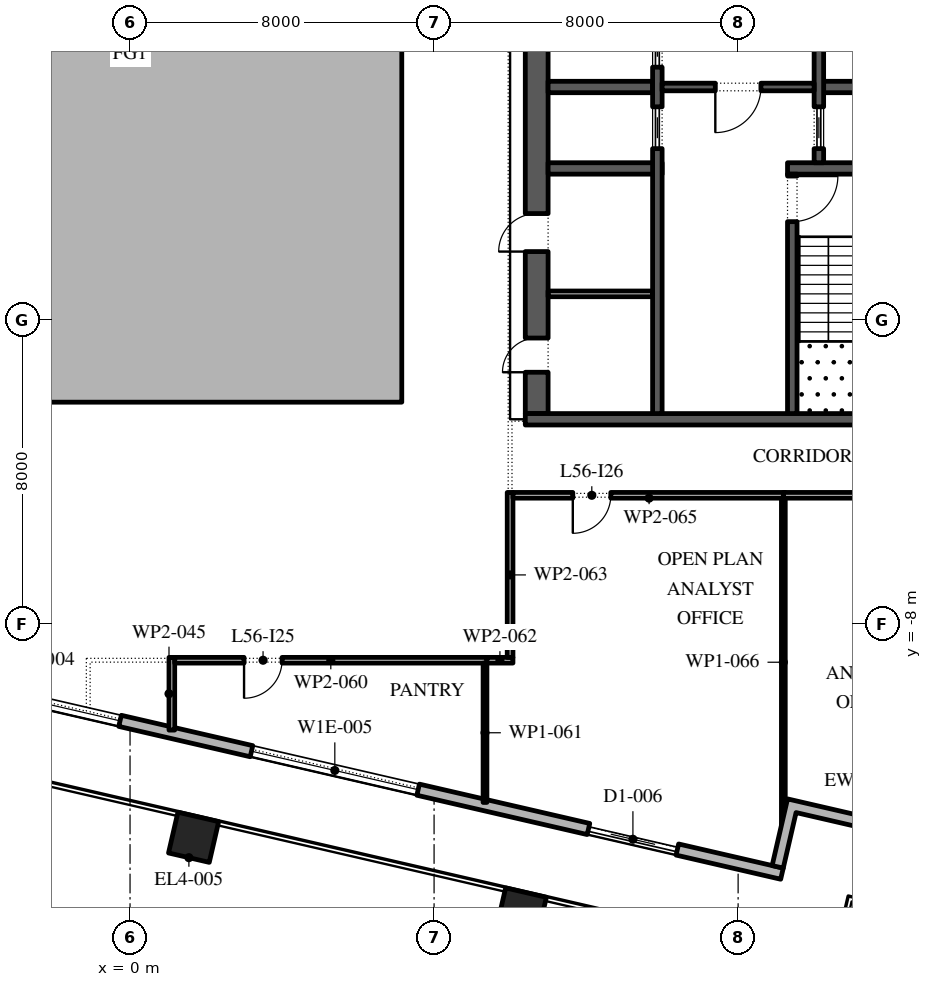
"""IFC4 building model, lengths in metres.
Left out: names, types, materials, properties, quantities, classifications, styles, units other than length and angle.
Written with IfcOpenShell. Run it as: python <this file> out.ifc"""

import sys

from ifc_helpers import new_model, si_unit, direction, frame, frame_2d, origin, origin_2d, place, context, subcontext, project, spatial, polyline, rectangle, outline, extrude, element, fill, save


model = new_model("IFC4")
c1 = context("Model", 3, precision=1e-05, world=origin(), true_north=direction((0.0, 1.0)))
c2 = subcontext(c1, "Body", "Model", "MODEL_VIEW")
j1 = project(units=[si_unit("LENGTHUNIT", "METRE"), si_unit("PLANEANGLEUNIT", "RADIAN")], contexts=[c1])
p1 = place(None, origin())
s1 = spatial("IfcSite", under=j1, at=p1, CompositionType="ELEMENT")
p2 = place(p1, origin())
s2 = spatial("IfcBuilding", under=s1, at=p2, CompositionType="ELEMENT")
p3 = place(p2, frame((0.0, 0.0, 259.8)))
s3 = spatial("IfcBuildingStorey", under=s2, at=p3, CompositionType="ELEMENT", Elevation=259.8)
for number, where, z_axis, x_axis in (
    (1, (1.672, -13.599, 0.0), (0.0, 0.0, 1.0), (0.974, -0.225, 0.0)),
    (2, (10.295, -15.59, 0.0), (0.0, 0.0, 1.0), (0.974, -0.225, 0.0)),
):
    element("IfcColumn", number, at=place(p3, frame(where, z_axis=z_axis, x_axis=x_axis)), inside=s3, PredefinedType="COLUMN", context=c2, shape_type="SweptSolid", body=[
        extrude(rectangle(XDim=1.1, YDim=1.1, at=origin_2d()), origin(), (0.0, 0.0, 1.0), 4.2),
    ])
p4 = place(p3, origin())
e3 = element("IfcWall", 3, at=p4, inside=s3, PredefinedType="STANDARD", context=c2, shape_type="SweptSolid", body=[
    extrude(outline(polyline([(-7.15, -2.15), (7.15, -2.15), (7.15, 16.15), (-7.15, 16.15), (-7.15, -2.15)]), holes=[polyline([(-7.0, -2.0), (-7.0, 16.0), (7.0, 16.0), (7.0, -2.0), (-7.0, -2.0)])]), origin(), (0.0, 0.0, 1.0), 4.0),
])
p5 = place(p3, frame((-29.616, -3.758, 0.0), z_axis=(0.0, 0.0, 1.0), x_axis=(0.974370532314, -0.224949029246, 0.0)))
e4 = element("IfcWall", 4, at=p5, inside=s3, PredefinedType="STANDARD", context=c2, shape_type="SweptSolid", body=[
    extrude(rectangle(XDim=48.0, YDim=0.3, at=frame_2d((24.0, 0.0))), origin(), (0.0, 0.0, 1.0), 4.0),
])
p6 = place(p5, frame((1.625, 0.0, 0.45)))
e5 = element("IfcOpeningElement", 5, at=p6, cuts=e4, PredefinedType="OPENING", context=c2, shape_type="SweptSolid", body=[
    extrude(rectangle(XDim=4.5, YDim=3.05, at=frame_2d((2.25, 1.525))), frame((0.0, 0.16, 0.0), z_axis=(0.0, -1.0, 0.0), x_axis=(1.0, 0.0, 0.0)), (0.0, 0.0, 1.0), 0.32),
])
p7 = place(p5, frame((10.575, 0.0, 0.0)))
e6 = element("IfcOpeningElement", 6, at=p7, cuts=e4, PredefinedType="OPENING", context=c2, shape_type="SweptSolid", body=[
    extrude(rectangle(XDim=2.4, YDim=3.5, at=frame_2d((1.2, 1.75))), frame((0.0, 0.16, 0.0), z_axis=(0.0, -1.0, 0.0), x_axis=(1.0, 0.0, 0.0)), (0.0, 0.0, 1.0), 0.32),
])
p8 = place(p5, frame((17.575, 0.0, 0.45)))
e7 = element("IfcOpeningElement", 7, at=p8, cuts=e4, PredefinedType="OPENING", context=c2, shape_type="SweptSolid", body=[
    extrude(rectangle(XDim=4.5, YDim=3.0, at=frame_2d((2.25, 1.5))), frame((0.0, 0.16, 0.0), z_axis=(0.0, -1.0, 0.0), x_axis=(1.0, 0.0, 0.0)), (0.0, 0.0, 1.0), 0.32),
])
p9 = place(p5, frame((25.625, 0.0, 0.45)))
e8 = element("IfcOpeningElement", 8, at=p9, cuts=e4, PredefinedType="OPENING", context=c2, shape_type="SweptSolid", body=[
    extrude(rectangle(XDim=4.5, YDim=2.95, at=frame_2d((2.25, 1.475))), frame((0.0, 0.16, 0.0), z_axis=(0.0, -1.0, 0.0), x_axis=(1.0, 0.0, 0.0)), (0.0, 0.0, 1.0), 0.32),
])
p10 = place(p5, frame((33.675, 0.0, 0.45)))
e9 = element("IfcOpeningElement", 9, at=p10, cuts=e4, PredefinedType="OPENING", context=c2, shape_type="SweptSolid", body=[
    extrude(rectangle(XDim=4.5, YDim=2.825, at=frame_2d((2.25, 1.413))), frame((0.0, 0.16, 0.0), z_axis=(0.0, -1.0, 0.0), x_axis=(1.0, 0.0, 0.0)), (0.0, 0.0, 1.0), 0.32),
])
p11 = place(p5, frame((42.775, 0.0, 0.0)))
e10 = element("IfcOpeningElement", 10, at=p11, cuts=e4, PredefinedType="OPENING", context=c2, shape_type="SweptSolid", body=[
    extrude(rectangle(XDim=2.4, YDim=3.5, at=frame_2d((1.2, 1.75))), frame((0.0, 0.16, 0.0), z_axis=(0.0, -1.0, 0.0), x_axis=(1.0, 0.0, 0.0)), (0.0, 0.0, 1.0), 0.32),
])
p12 = place(p3, origin())
e11 = element("IfcWall", 11, at=p12, inside=s3, PredefinedType="STANDARD", context=c2, shape_type="SweptSolid", body=[
    extrude(outline(polyline([(19.054, -12.993), (19.459, -11.24), (21.505, -11.712), (21.438, -12.004), (19.684, -11.599), (19.279, -13.353), (17.525, -12.948), (17.188, -14.41), (16.895, -14.342), (17.3, -12.588), (19.054, -12.993)])), origin(), (0.0, 0.0, 1.0), 4.0),
])
p13 = place(p3, frame((10.7, -2.45, 0.0), z_axis=(0.0, 0.0, 1.0), x_axis=(0.0, 1.0, 0.0)))
e12 = element("IfcWall", 12, at=p13, inside=s3, PredefinedType="SHEAR", context=c2, shape_type="SweptSolid", body=[
    extrude(rectangle(XDim=27.9, YDim=0.6, at=frame_2d((13.95, 0.0))), origin(), (0.0, 0.0, 1.0), 4.0),
])
p14 = place(p13, frame((23.65, 0.0, 0.0)))
e13 = element("IfcOpeningElement", 13, at=p14, cuts=e12, PredefinedType="OPENING", context=c2, shape_type="SweptSolid", body=[
    extrude(rectangle(XDim=2.4, YDim=2.1, at=frame_2d((1.2, 1.05))), frame((0.0, 0.31, 0.0), z_axis=(0.0, -1.0, 0.0), x_axis=(1.0, 0.0, 0.0)), (0.0, 0.0, 1.0), 0.62),
])
p15 = place(p13, frame((1.087, 0.0, 0.0)))
e14 = element("IfcOpeningElement", 14, at=p15, cuts=e12, PredefinedType="OPENING", context=c2, shape_type="SweptSolid", body=[
    extrude(rectangle(XDim=0.9, YDim=2.1, at=frame_2d((0.45, 1.05))), frame((0.0, 0.31, 0.0), z_axis=(0.0, -1.0, 0.0), x_axis=(1.0, 0.0, 0.0)), (0.0, 0.0, 1.0), 0.62),
])
p16 = place(p13, frame((4.262, 0.0, 0.0)))
e15 = element("IfcOpeningElement", 15, at=p16, cuts=e12, PredefinedType="OPENING", context=c2, shape_type="SweptSolid", body=[
    extrude(rectangle(XDim=1.0, YDim=2.1, at=frame_2d((0.5, 1.05))), frame((0.0, 0.31, 0.0), z_axis=(0.0, -1.0, 0.0), x_axis=(1.0, 0.0, 0.0)), (0.0, 0.0, 1.0), 0.62),
])
p17 = place(p3, frame((10.4, -2.6, 0.0), z_axis=(0.0, 0.0, 1.0), x_axis=(1.0, 0.0, 0.0)))
e16 = element("IfcWall", 16, at=p17, inside=s3, PredefinedType="SHEAR", context=c2, shape_type="SweptSolid", body=[
    extrude(rectangle(XDim=11.2, YDim=0.3, at=frame_2d((5.6, 0.0))), origin(), (0.0, 0.0, 1.0), 4.0),
])
p18 = place(p3, frame((17.3, 4.0, 0.0), z_axis=(0.0, 0.0, 1.0), x_axis=(1.0, 0.0, 0.0)))
e17 = element("IfcWall", 17, at=p18, inside=s3, PredefinedType="SHEAR", context=c2, shape_type="SweptSolid", body=[
    extrude(rectangle(XDim=3.7, YDim=0.3, at=frame_2d((1.85, 0.0))), origin(), (0.0, 0.0, 1.0), 4.0),
])
p19 = place(p3, frame((17.425, -2.45, 0.0), z_axis=(0.0, 0.0, 1.0), x_axis=(0.0, 1.0, 0.0)))
e18 = element("IfcWall", 18, at=p19, inside=s3, PredefinedType="SHEAR", context=c2, shape_type="SweptSolid", body=[
    extrude(rectangle(XDim=6.3, YDim=0.25, at=frame_2d((3.15, 0.0))), origin(), (0.0, 0.0, 1.0), 4.0),
])
p20 = place(p19, frame((5.05, 0.0, 0.0)))
e19 = element("IfcOpeningElement", 19, at=p20, cuts=e18, PredefinedType="OPENING", context=c2, shape_type="SweptSolid", body=[
    extrude(rectangle(XDim=1.2, YDim=2.1, at=frame_2d((0.6, 1.05))), frame((0.0, 0.135, 0.0), z_axis=(0.0, -1.0, 0.0), x_axis=(1.0, 0.0, 0.0)), (0.0, 0.0, 1.0), 0.27),
])
p21 = place(p3, frame((18.25, 6.143, 0.0), z_axis=(0.0, 0.0, 1.0), x_axis=(1.0, 0.0, 0.0)))
e20 = element("IfcWall", 20, at=p21, inside=s3, PredefinedType="SHEAR", context=c2, shape_type="SweptSolid", body=[
    extrude(rectangle(XDim=2.75, YDim=0.3, at=frame_2d((1.375, 0.0))), origin(), (0.0, 0.0, 1.0), 4.0),
])
p22 = place(p3, frame((18.125, 4.15, 0.0), z_axis=(0.0, 0.0, 1.0), x_axis=(0.0, 1.0, 0.0)))
e21 = element("IfcWall", 21, at=p22, inside=s3, PredefinedType="SHEAR", context=c2, shape_type="SweptSolid", body=[
    extrude(rectangle(XDim=14.7, YDim=0.25, at=frame_2d((7.35, 0.0))), origin(), (0.0, 0.0, 1.0), 4.0),
])
p23 = place(p22, frame((3.246, 0.0, 0.0)))
e22 = element("IfcOpeningElement", 22, at=p23, cuts=e21, PredefinedType="OPENING", context=c2, shape_type="SweptSolid", body=[
    extrude(rectangle(XDim=0.9, YDim=2.1, at=frame_2d((0.45, 1.05))), frame((0.0, 0.135, 0.0), z_axis=(0.0, -1.0, 0.0), x_axis=(1.0, 0.0, 0.0)), (0.0, 0.0, 1.0), 0.27),
])
p24 = place(p22, frame((8.454, 0.0, 0.0)))
e23 = element("IfcOpeningElement", 23, at=p24, cuts=e21, PredefinedType="OPENING", context=c2, shape_type="SweptSolid", body=[
    extrude(rectangle(XDim=0.9, YDim=2.1, at=frame_2d((0.45, 1.05))), frame((0.0, 0.135, 0.0), z_axis=(0.0, -1.0, 0.0), x_axis=(1.0, 0.0, 0.0)), (0.0, 0.0, 1.0), 0.27),
])
p25 = place(p22, frame((0.371, 0.0, 0.0)))
e24 = element("IfcOpeningElement", 24, at=p25, cuts=e21, PredefinedType="OPENING", context=c2, shape_type="SweptSolid", body=[
    extrude(rectangle(XDim=1.1, YDim=2.1, at=frame_2d((0.55, 1.05))), frame((0.0, 0.135, 0.0), z_axis=(0.0, -1.0, 0.0), x_axis=(1.0, 0.0, 0.0)), (0.0, 0.0, 1.0), 0.27),
])
p26 = place(p22, frame((13.229, 0.0, 0.0)))
e25 = element("IfcOpeningElement", 25, at=p26, cuts=e21, PredefinedType="OPENING", context=c2, shape_type="SweptSolid", body=[
    extrude(rectangle(XDim=1.1, YDim=2.1, at=frame_2d((0.55, 1.05))), frame((0.0, 0.135, 0.0), z_axis=(0.0, -1.0, 0.0), x_axis=(1.0, 0.0, 0.0)), (0.0, 0.0, 1.0), 0.27),
])
p27 = place(p3, frame((11.0, 4.0, 0.0), z_axis=(0.0, 0.0, 1.0), x_axis=(1.0, 0.0, 0.0)))
e26 = element("IfcWall", 26, at=p27, inside=s3, PredefinedType="SHEAR", context=c2, shape_type="SweptSolid", body=[
    extrude(rectangle(XDim=3.0, YDim=0.3, at=frame_2d((1.5, 0.0))), origin(), (0.0, 0.0, 1.0), 4.0),
])
p28 = place(p3, frame((11.0, 6.143, 0.0), z_axis=(0.0, 0.0, 1.0), x_axis=(1.0, 0.0, 0.0)))
e27 = element("IfcWall", 27, at=p28, inside=s3, PredefinedType="SHEAR", context=c2, shape_type="SweptSolid", body=[
    extrude(rectangle(XDim=2.75, YDim=0.3, at=frame_2d((1.375, 0.0))), origin(), (0.0, 0.0, 1.0), 4.0),
])
p29 = place(p3, frame((13.875, -2.45, 0.0), z_axis=(0.0, 0.0, 1.0), x_axis=(0.0, 1.0, 0.0)))
e28 = element("IfcWall", 28, at=p29, inside=s3, PredefinedType="SHEAR", context=c2, shape_type="SweptSolid", body=[
    extrude(rectangle(XDim=21.3, YDim=0.25, at=frame_2d((10.65, 0.0))), origin(), (0.0, 0.0, 1.0), 4.0),
])
p30 = place(p29, frame((16.261, 0.0, 0.0)))
e29 = element("IfcOpeningElement", 29, at=p30, cuts=e28, PredefinedType="OPENING", context=c2, shape_type="SweptSolid", body=[
    extrude(rectangle(XDim=0.9, YDim=2.1, at=frame_2d((0.45, 1.05))), frame((0.0, 0.135, 0.0), z_axis=(0.0, -1.0, 0.0), x_axis=(1.0, 0.0, 0.0)), (0.0, 0.0, 1.0), 0.27),
])
p31 = place(p29, frame((19.325, 0.0, 0.0)))
e30 = element("IfcOpeningElement", 30, at=p31, cuts=e28, PredefinedType="OPENING", context=c2, shape_type="SweptSolid", body=[
    extrude(rectangle(XDim=0.9, YDim=2.1, at=frame_2d((0.45, 1.05))), frame((0.0, 0.135, 0.0), z_axis=(0.0, -1.0, 0.0), x_axis=(1.0, 0.0, 0.0)), (0.0, 0.0, 1.0), 0.27),
])
p32 = place(p29, frame((6.971, 0.0, 0.0)))
e31 = element("IfcOpeningElement", 31, at=p32, cuts=e28, PredefinedType="OPENING", context=c2, shape_type="SweptSolid", body=[
    extrude(rectangle(XDim=1.1, YDim=2.1, at=frame_2d((0.55, 1.05))), frame((0.0, 0.135, 0.0), z_axis=(0.0, -1.0, 0.0), x_axis=(1.0, 0.0, 0.0)), (0.0, 0.0, 1.0), 0.27),
])
p33 = place(p29, frame((9.114, 0.0, 0.0)))
e32 = element("IfcOpeningElement", 32, at=p33, cuts=e28, PredefinedType="OPENING", context=c2, shape_type="SweptSolid", body=[
    extrude(rectangle(XDim=1.1, YDim=2.1, at=frame_2d((0.55, 1.05))), frame((0.0, 0.135, 0.0), z_axis=(0.0, -1.0, 0.0), x_axis=(1.0, 0.0, 0.0)), (0.0, 0.0, 1.0), 0.27),
])
p34 = place(p29, frame((11.257, 0.0, 0.0)))
e33 = element("IfcOpeningElement", 33, at=p34, cuts=e28, PredefinedType="OPENING", context=c2, shape_type="SweptSolid", body=[
    extrude(rectangle(XDim=1.1, YDim=2.1, at=frame_2d((0.55, 1.05))), frame((0.0, 0.135, 0.0), z_axis=(0.0, -1.0, 0.0), x_axis=(1.0, 0.0, 0.0)), (0.0, 0.0, 1.0), 0.27),
])
p35 = place(p29, frame((13.4, 0.0, 0.0)))
e34 = element("IfcOpeningElement", 34, at=p35, cuts=e28, PredefinedType="OPENING", context=c2, shape_type="SweptSolid", body=[
    extrude(rectangle(XDim=1.1, YDim=2.1, at=frame_2d((0.55, 1.05))), frame((0.0, 0.135, 0.0), z_axis=(0.0, -1.0, 0.0), x_axis=(1.0, 0.0, 0.0)), (0.0, 0.0, 1.0), 0.27),
])
p36 = place(p3, frame((14.0, 6.143, 0.0), z_axis=(0.0, 0.0, 1.0), x_axis=(1.0, 0.0, 0.0)))
e35 = element("IfcWall", 35, at=p36, inside=s3, PredefinedType="SHEAR", context=c2, shape_type="SweptSolid", body=[
    extrude(rectangle(XDim=4.0, YDim=0.2, at=frame_2d((2.0, 0.0))), origin(), (0.0, 0.0, 1.0), 4.0),
])
p37 = place(p36, frame((1.4, 0.0, 0.0)))
e36 = element("IfcOpeningElement", 36, at=p37, cuts=e35, PredefinedType="OPENING", context=c2, shape_type="SweptSolid", body=[
    extrude(rectangle(XDim=1.2, YDim=2.1, at=frame_2d((0.6, 1.05))), frame((0.0, 0.11, 0.0), z_axis=(0.0, -1.0, 0.0), x_axis=(1.0, 0.0, 0.0)), (0.0, 0.0, 1.0), 0.22),
])
p38 = place(p3, frame((11.0, 0.7, 0.0), z_axis=(0.0, 0.0, 1.0), x_axis=(1.0, 0.0, 0.0)))
e37 = element("IfcWall", 37, at=p38, inside=s3, PredefinedType="PARTITIONING", context=c2, shape_type="SweptSolid", body=[
    extrude(rectangle(XDim=2.75, YDim=0.15, at=frame_2d((1.375, 0.0))), origin(), (0.0, 0.0, 1.0), 4.0),
])
p39 = place(p3, frame((1.1, -8.865, 0.0), z_axis=(0.0, 0.0, 1.0), x_axis=(0.0, -1.0, 0.0)))
e38 = element("IfcWall", 38, at=p39, inside=s3, PredefinedType="PARTITIONING", context=c2, shape_type="SweptSolid", body=[
    extrude(rectangle(XDim=1.913, YDim=0.15, at=frame_2d((0.957, 0.0))), origin(), (0.0, 0.0, 1.0), 4.0),
])
p40 = place(p3, frame((9.39, -8.94, 0.0), z_axis=(0.0, 0.0, 1.0), x_axis=(-1.0, 0.0, 0.0)))
e39 = element("IfcWall", 39, at=p40, inside=s3, PredefinedType="PARTITIONING", context=c2, shape_type="SweptSolid", body=[
    extrude(rectangle(XDim=8.215, YDim=0.15, at=frame_2d((4.107, 0.0))), origin(), (0.0, 0.0, 1.0), 4.0),
])
p41 = place(p40, frame((5.39, 0.0, 0.0)))
e40 = element("IfcOpeningElement", 40, at=p41, cuts=e39, PredefinedType="OPENING", context=c2, shape_type="SweptSolid", body=[
    extrude(rectangle(XDim=1.0, YDim=2.1, at=frame_2d((0.5, 1.05))), frame((0.0, 0.085, 0.0), z_axis=(0.0, -1.0, 0.0), x_axis=(1.0, 0.0, 0.0)), (0.0, 0.0, 1.0), 0.17),
])
p42 = place(p3, frame((9.34, -9.015, 0.0), z_axis=(0.0, 0.0, 1.0), x_axis=(0.0, -1.0, 0.0)))
e41 = element("IfcWall", 41, at=p42, inside=s3, PredefinedType="PARTITIONING", context=c2, shape_type="SweptSolid", body=[
    extrude(rectangle(XDim=3.666, YDim=0.1, at=frame_2d((1.833, 0.0))), origin(), (0.0, 0.0, 1.0), 4.0),
])
p43 = place(p3, frame((10.075, -8.94, 0.0), z_axis=(0.0, 0.0, 1.0), x_axis=(-1.0, 0.0, 0.0)))
e42 = element("IfcWall", 42, at=p43, inside=s3, PredefinedType="PARTITIONING", context=c2, shape_type="SweptSolid", body=[
    extrude(rectangle(XDim=0.685, YDim=0.15, at=frame_2d((0.343, 0.0))), origin(), (0.0, 0.0, 1.0), 4.0),
])
p44 = place(p3, frame((10.0, -4.525, 0.0), z_axis=(0.0, 0.0, 1.0), x_axis=(0.0, -1.0, 0.0)))
e43 = element("IfcWall", 43, at=p44, inside=s3, PredefinedType="PARTITIONING", context=c2, shape_type="SweptSolid", body=[
    extrude(rectangle(XDim=4.34, YDim=0.15, at=frame_2d((2.17, 0.0))), origin(), (0.0, 0.0, 1.0), 4.0),
])
p45 = place(p3, frame((17.24, -4.6, 0.0), z_axis=(0.0, 0.0, 1.0), x_axis=(-1.0, 0.0, 0.0)))
e44 = element("IfcWall", 44, at=p45, inside=s3, PredefinedType="PARTITIONING", context=c2, shape_type="SweptSolid", body=[
    extrude(rectangle(XDim=7.165, YDim=0.15, at=frame_2d((3.583, 0.0))), origin(), (0.0, 0.0, 1.0), 4.0),
])
p46 = place(p45, frame((4.59, 0.0, 0.0)))
e45 = element("IfcOpeningElement", 45, at=p46, cuts=e44, PredefinedType="OPENING", context=c2, shape_type="SweptSolid", body=[
    extrude(rectangle(XDim=1.0, YDim=2.1, at=frame_2d((0.5, 1.05))), frame((0.0, 0.085, 0.0), z_axis=(0.0, -1.0, 0.0), x_axis=(1.0, 0.0, 0.0)), (0.0, 0.0, 1.0), 0.17),
])
p47 = place(p3, frame((17.19, -4.675, 0.0), z_axis=(0.0, 0.0, 1.0), x_axis=(0.0, -1.0, 0.0)))
e46 = element("IfcWall", 46, at=p47, inside=s3, PredefinedType="PARTITIONING", context=c2, shape_type="SweptSolid", body=[
    extrude(rectangle(XDim=8.635, YDim=0.1, at=frame_2d((4.317, 0.0))), origin(), (0.0, 0.0, 1.0), 4.0),
])
p48 = place(p3, frame((22.922, -4.6, 0.0), z_axis=(0.0, 0.0, 1.0), x_axis=(-1.0, 0.0, 0.0)))
e47 = element("IfcWall", 47, at=p48, inside=s3, PredefinedType="PARTITIONING", context=c2, shape_type="SweptSolid", body=[
    extrude(rectangle(XDim=5.732, YDim=0.15, at=frame_2d((2.866, 0.0))), origin(), (0.0, 0.0, 1.0), 4.0),
])
p49 = place(p48, frame((1.582, 0.0, 0.0)))
e48 = element("IfcOpeningElement", 48, at=p49, cuts=e47, PredefinedType="OPENING", context=c2, shape_type="SweptSolid", body=[
    extrude(rectangle(XDim=1.0, YDim=2.1, at=frame_2d((0.5, 1.05))), frame((0.0, 0.085, 0.0), z_axis=(0.0, -1.0, 0.0), x_axis=(1.0, 0.0, 0.0)), (0.0, 0.0, 1.0), 0.17),
])
p50 = place(p9, origin())
e49 = element("IfcWindow", 49, at=p50, inside=s3, PartitioningType="DOUBLE_PANEL_VERTICAL", PredefinedType="WINDOW", context=c2, shape_type="SweptSolid", body=[
    extrude(rectangle(XDim=4.5, YDim=2.95, at=frame_2d((2.25, 1.475))), frame((0.0, 0.03, 0.0), z_axis=(0.0, -1.0, 0.0), x_axis=(1.0, 0.0, 0.0)), (0.0, 0.0, 1.0), 0.06),
])
fill(e8, e49)
p51 = place(p10, origin())
e50 = element("IfcWindow", 50, at=p51, inside=s3, PartitioningType="DOUBLE_PANEL_VERTICAL", PredefinedType="WINDOW", context=c2, shape_type="SweptSolid", body=[
    extrude(rectangle(XDim=4.5, YDim=2.825, at=frame_2d((2.25, 1.413))), frame((0.0, 0.03, 0.0), z_axis=(0.0, -1.0, 0.0), x_axis=(1.0, 0.0, 0.0)), (0.0, 0.0, 1.0), 0.06),
])
fill(e9, e50)
p52 = place(p11, origin())
e51 = element("IfcDoor", 51, at=p52, inside=s3, OperationType="DOUBLE_DOOR_SLIDING", PredefinedType="DOOR", context=c2, shape_type="SweptSolid", body=[
    extrude(rectangle(XDim=2.4, YDim=3.5, at=frame_2d((1.2, 1.75))), frame((0.0, 0.025, 0.0), z_axis=(0.0, -1.0, 0.0), x_axis=(1.0, 0.0, 0.0)), (0.0, 0.0, 1.0), 0.05),
])
fill(e10, e51)
p53 = place(p25, origin())
e52 = element("IfcDoor", 52, at=p53, inside=s3, OperationType="SLIDING_TO_LEFT", PredefinedType="DOOR", context=c2, shape_type="SweptSolid", body=[
    extrude(rectangle(XDim=1.1, YDim=2.1, at=frame_2d((0.55, 1.05))), frame((0.0, 0.025, 0.0), z_axis=(0.0, -1.0, 0.0), x_axis=(1.0, 0.0, 0.0)), (0.0, 0.0, 1.0), 0.05),
])
fill(e24, e52)
p54 = place(p32, origin())
e53 = element("IfcDoor", 53, at=p54, inside=s3, OperationType="SLIDING_TO_LEFT", PredefinedType="DOOR", context=c2, shape_type="SweptSolid", body=[
    extrude(rectangle(XDim=1.1, YDim=2.1, at=frame_2d((0.55, 1.05))), frame((0.0, 0.025, 0.0), z_axis=(0.0, -1.0, 0.0), x_axis=(1.0, 0.0, 0.0)), (0.0, 0.0, 1.0), 0.05),
])
fill(e31, e53)
p55 = place(p33, origin())
e54 = element("IfcDoor", 54, at=p55, inside=s3, OperationType="SLIDING_TO_LEFT", PredefinedType="DOOR", context=c2, shape_type="SweptSolid", body=[
    extrude(rectangle(XDim=1.1, YDim=2.1, at=frame_2d((0.55, 1.05))), frame((0.0, 0.025, 0.0), z_axis=(0.0, -1.0, 0.0), x_axis=(1.0, 0.0, 0.0)), (0.0, 0.0, 1.0), 0.05),
])
fill(e32, e54)
p56 = place(p37, frame((1.2, 0.0, 0.0), z_axis=(0.0, 0.0, 1.0), x_axis=(-1.0, 0.0, 0.0)))
e55 = element("IfcDoor", 55, at=p56, inside=s3, OperationType="SINGLE_SWING_LEFT", PredefinedType="DOOR", context=c2, shape_type="SweptSolid", body=[
    extrude(rectangle(XDim=1.2, YDim=2.1, at=frame_2d((0.6, 1.05))), frame((0.0, 0.025, 0.0), z_axis=(0.0, -1.0, 0.0), x_axis=(1.0, 0.0, 0.0)), (0.0, 0.0, 1.0), 0.05),
])
fill(e36, e55)
p57 = place(p20, frame((1.2, 0.0, 0.0), z_axis=(0.0, 0.0, 1.0), x_axis=(-1.0, 0.0, 0.0)))
e56 = element("IfcDoor", 56, at=p57, inside=s3, OperationType="SINGLE_SWING_RIGHT", PredefinedType="DOOR", context=c2, shape_type="SweptSolid", body=[
    extrude(rectangle(XDim=1.2, YDim=2.1, at=frame_2d((0.6, 1.05))), frame((0.0, 0.025, 0.0), z_axis=(0.0, -1.0, 0.0), x_axis=(1.0, 0.0, 0.0)), (0.0, 0.0, 1.0), 0.05),
])
fill(e19, e56)
p58 = place(p15, origin())
e57 = element("IfcDoor", 57, at=p58, inside=s3, OperationType="SINGLE_SWING_RIGHT", PredefinedType="DOOR", context=c2, shape_type="SweptSolid", body=[
    extrude(rectangle(XDim=0.9, YDim=2.1, at=frame_2d((0.45, 1.05))), frame((0.0, -0.25, 0.0), z_axis=(0.0, -1.0, 0.0), x_axis=(1.0, 0.0, 0.0)), (0.0, 0.0, 1.0), 0.05),
])
fill(e14, e57)
p59 = place(p16, origin())
e58 = element("IfcDoor", 58, at=p59, inside=s3, OperationType="SINGLE_SWING_RIGHT", PredefinedType="DOOR", context=c2, shape_type="SweptSolid", body=[
    extrude(rectangle(XDim=1.0, YDim=2.1, at=frame_2d((0.5, 1.05))), frame((0.0, -0.25, 0.0), z_axis=(0.0, -1.0, 0.0), x_axis=(1.0, 0.0, 0.0)), (0.0, 0.0, 1.0), 0.05),
])
fill(e15, e58)
p60 = place(p41, origin())
e59 = element("IfcDoor", 59, at=p60, inside=s3, OperationType="SINGLE_SWING_LEFT", PredefinedType="DOOR", context=c2, shape_type="SweptSolid", body=[
    extrude(rectangle(XDim=1.0, YDim=2.1, at=frame_2d((0.5, 1.05))), frame((0.0, 0.025, 0.0), z_axis=(0.0, -1.0, 0.0), x_axis=(1.0, 0.0, 0.0)), (0.0, 0.0, 1.0), 0.05),
])
fill(e40, e59)
p61 = place(p46, origin())
e60 = element("IfcDoor", 60, at=p61, inside=s3, OperationType="SINGLE_SWING_LEFT", PredefinedType="DOOR", context=c2, shape_type="SweptSolid", body=[
    extrude(rectangle(XDim=1.0, YDim=2.1, at=frame_2d((0.5, 1.05))), frame((0.0, 0.025, 0.0), z_axis=(0.0, -1.0, 0.0), x_axis=(1.0, 0.0, 0.0)), (0.0, 0.0, 1.0), 0.05),
])
fill(e45, e60)
save(model, sys.argv[1])
